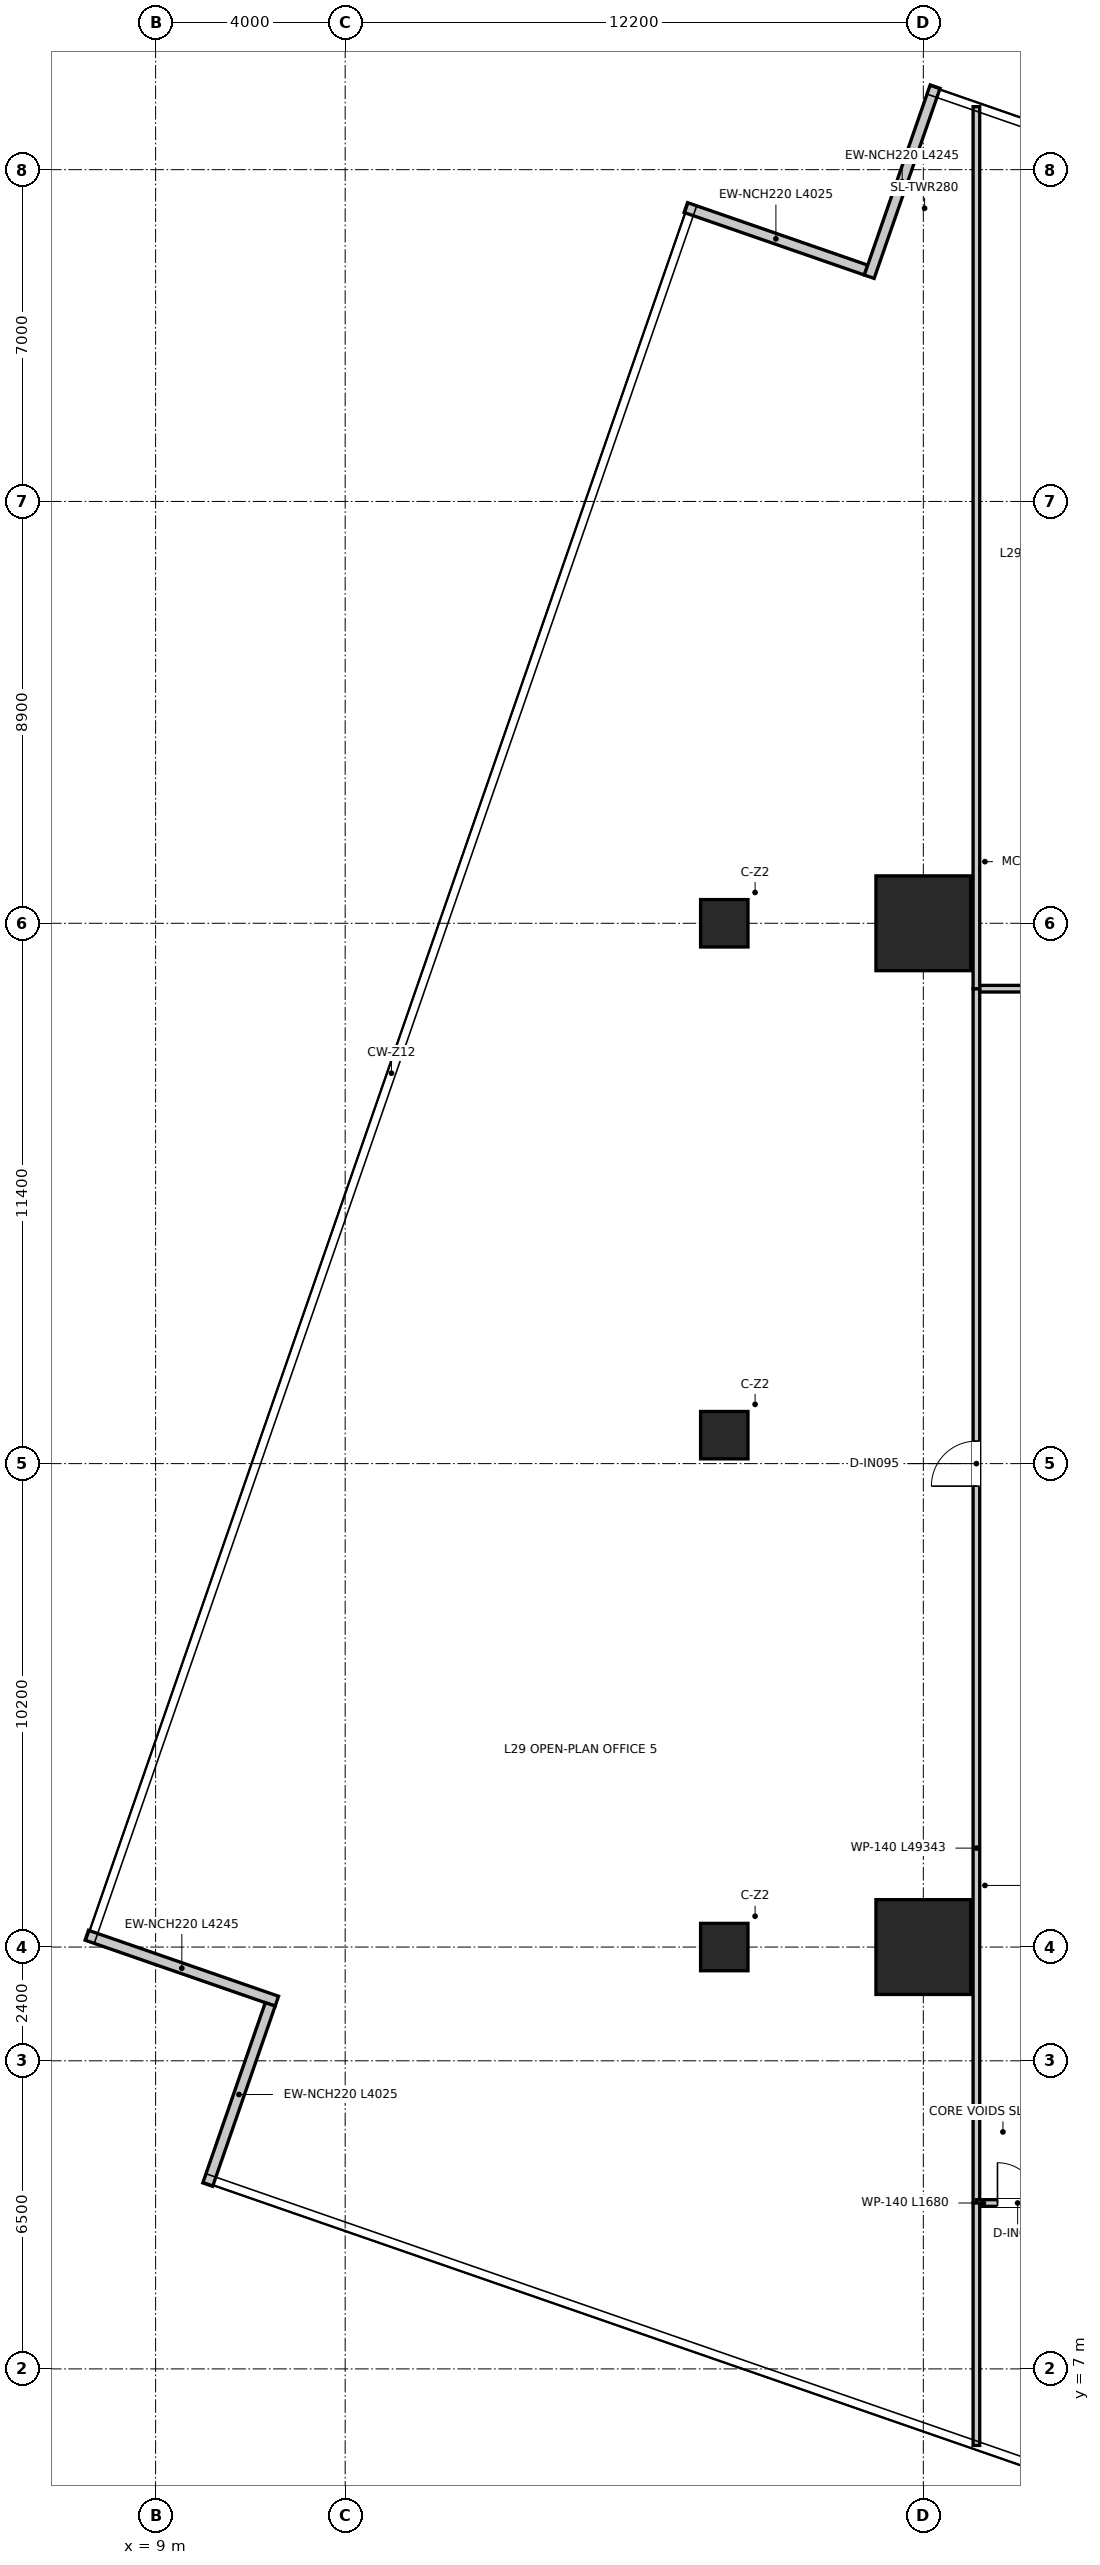
"""IFC4 building model, lengths in metres.
Left out: names, types, materials, properties, quantities, classifications, styles, units other than length and angle.
Written with IfcOpenShell. Run it as: python <this file> out.ifc"""

import sys

from ifc_helpers import new_model, si_unit, direction, frame, frame_2d, origin, origin_2d, place, context, subcontext, project, spatial, rectangle, extrude, source, transform, mapped, element, fill, save


model = new_model("IFC4")
c1 = context("Model", 3, precision=1e-05, world=origin(), true_north=direction((0.0, 1.0)))
c2 = subcontext(c1, "Body", "Model", "MODEL_VIEW")
j1 = project(units=[si_unit("LENGTHUNIT", "METRE"), si_unit("PLANEANGLEUNIT", "RADIAN")], contexts=[c1])
p1 = place(None, origin())
s1 = spatial("IfcSite", under=j1, at=p1, CompositionType="ELEMENT")
p2 = place(p1, origin())
s2 = spatial("IfcBuilding", under=s1, at=p2, CompositionType="ELEMENT")
p3 = place(p2, frame((0.0, 0.0, 121.65)))
s3 = spatial("IfcBuildingStorey", under=s2, at=p3, CompositionType="ELEMENT", Elevation=121.65)
m1 = source(origin(), c2, "Body", "SweptSolid", [
    extrude(rectangle(XDim=2.0, YDim=2.0, at=origin_2d()), origin(), (0.0, 0.0, 1.0), 3.95),
])
for number, where, z_axis, x_axis in (
    (1, (25.2, 15.9, 0.0), (0.0, 0.0, 1.0), (1.0, 0.0, 0.0)),
    (2, (25.2, 37.5, 0.0), (0.0, 0.0, 1.0), (1.0, 0.0, 0.0)),
):
    element("IfcColumn", number, at=place(p3, frame(where, z_axis=z_axis, x_axis=x_axis)), inside=s3, PredefinedType="USERDEFINED", context=c2, shape_type="MappedRepresentation", body=[
        mapped(m1, transform((0.0, 0.0, 0.0), x_axis=(1.0, 0.0, 0.0), y_axis=(0.0, 1.0, 0.0), z_axis=(0.0, 0.0, 1.0), scale=1.0)),
    ])
m2 = source(origin(), c2, "Body", "SweptSolid", [
    extrude(rectangle(XDim=1.0, YDim=1.0, at=origin_2d()), origin(), (0.0, 0.0, 1.0), 3.95),
])
for number, where, z_axis, x_axis in (
    (3, (21.0, 15.9, 0.0), (0.0, 0.0, 1.0), (1.0, 0.0, 0.0)),
    (4, (21.0, 26.7, 0.0), (0.0, 0.0, 1.0), (1.0, 0.0, 0.0)),
    (5, (21.0, 37.5, 0.0), (0.0, 0.0, 1.0), (1.0, 0.0, 0.0)),
):
    element("IfcColumn", number, at=place(p3, frame(where, z_axis=z_axis, x_axis=x_axis)), inside=s3, PredefinedType="COLUMN", context=c2, shape_type="MappedRepresentation", body=[
        mapped(m2, transform((0.0, 0.0, 0.0), x_axis=(1.0, 0.0, 0.0), y_axis=(0.0, 1.0, 0.0), z_axis=(0.0, 0.0, 1.0), scale=1.0)),
    ])
p4 = place(p3, frame((23.991, 51.281, 0.0), z_axis=(0.0, 0.0, 1.0), x_axis=(-0.944792639593, 0.327668839181, 0.0)))
e6 = element("IfcWall", 6, at=p4, inside=s3, PredefinedType="ELEMENTEDWALL", context=c2, shape_type="SweptSolid", body=[
    extrude(rectangle(XDim=4.025, YDim=0.22, at=frame_2d((2.012, 0.0))), origin(), (0.0, 0.0, 1.0), 3.67),
])
p5 = place(p3, frame((7.548, 16.149, 0.0), z_axis=(0.0, 0.0, 1.0), x_axis=(0.944801308279, -0.327643843028, 0.0)))
e7 = element("IfcWall", 7, at=p5, inside=s3, PredefinedType="ELEMENTEDWALL", context=c2, shape_type="SweptSolid", body=[
    extrude(rectangle(XDim=4.245, YDim=0.22, at=frame_2d((2.123, 0.0))), origin(), (0.0, 0.0, 1.0), 3.67),
])
p6 = place(p3, frame((11.419, 14.691, 0.0), z_axis=(0.0, 0.0, 1.0), x_axis=(-0.327668839181, -0.944792639593, 0.0)))
e8 = element("IfcWall", 8, at=p6, inside=s3, PredefinedType="ELEMENTEDWALL", context=c2, shape_type="SweptSolid", body=[
    extrude(rectangle(XDim=4.025, YDim=0.22, at=frame_2d((2.012, 0.0))), origin(), (0.0, 0.0, 1.0), 3.67),
])
p7 = place(p3, frame((25.449, 55.152, 0.0), z_axis=(0.0, 0.0, 1.0), x_axis=(-0.327643843028, -0.944801308279, 0.0)))
e9 = element("IfcWall", 9, at=p7, inside=s3, PredefinedType="ELEMENTEDWALL", context=c2, shape_type="SweptSolid", body=[
    extrude(rectangle(XDim=4.245, YDim=0.22, at=frame_2d((2.123, 0.0))), origin(), (0.0, 0.0, 1.0), 3.67),
])
p8 = place(p3, frame((26.32, 36.12, 0.0), z_axis=(0.0, 0.0, 1.0), x_axis=(1.0, 0.0, 0.0)))
e10 = element("IfcWall", 10, at=p8, inside=s3, PredefinedType="PARTITIONING", context=c2, shape_type="SweptSolid", body=[
    extrude(rectangle(XDim=19.36, YDim=0.14, at=frame_2d((9.68, 0.0))), origin(), (0.0, 0.0, 1.0), 3.08),
])
p9 = place(p8, frame((1.615, 0.0, 0.0)))
e11 = element("IfcOpeningElement", 11, at=p9, cuts=e10, PredefinedType="OPENING", context=c2, shape_type="SweptSolid", body=[
    extrude(rectangle(XDim=0.95, YDim=2.1, at=frame_2d((0.475, 1.05))), frame((0.0, 0.08, 0.0), z_axis=(0.0, -1.0, 0.0), x_axis=(1.0, 0.0, 0.0)), (0.0, 0.0, 1.0), 0.16),
])
p10 = place(p8, frame((6.705, 0.0, 0.0)))
e12 = element("IfcOpeningElement", 12, at=p10, cuts=e10, PredefinedType="OPENING", context=c2, shape_type="SweptSolid", body=[
    extrude(rectangle(XDim=0.95, YDim=2.1, at=frame_2d((0.475, 1.05))), frame((0.0, 0.08, 0.0), z_axis=(0.0, -1.0, 0.0), x_axis=(1.0, 0.0, 0.0)), (0.0, 0.0, 1.0), 0.16),
])
p11 = place(p8, frame((12.705, 0.0, 0.0)))
e13 = element("IfcOpeningElement", 13, at=p11, cuts=e10, PredefinedType="OPENING", context=c2, shape_type="SweptSolid", body=[
    extrude(rectangle(XDim=0.95, YDim=2.1, at=frame_2d((0.475, 1.05))), frame((0.0, 0.08, 0.0), z_axis=(0.0, -1.0, 0.0), x_axis=(1.0, 0.0, 0.0)), (0.0, 0.0, 1.0), 0.16),
])
p12 = place(p8, frame((17.295, 0.0, 0.0)))
e14 = element("IfcOpeningElement", 14, at=p12, cuts=e10, PredefinedType="OPENING", context=c2, shape_type="SweptSolid", body=[
    extrude(rectangle(XDim=0.95, YDim=2.1, at=frame_2d((0.475, 1.05))), frame((0.0, 0.08, 0.0), z_axis=(0.0, -1.0, 0.0), x_axis=(1.0, 0.0, 0.0)), (0.0, 0.0, 1.0), 0.16),
])
p13 = place(p3, frame((26.32, 10.5, 0.0), z_axis=(0.0, 0.0, 1.0), x_axis=(0.0, 1.0, 0.0)))
e15 = element("IfcWall", 15, at=p13, inside=s3, PredefinedType="PARTITIONING", context=c2, shape_type="SweptSolid", body=[
    extrude(rectangle(XDim=25.62, YDim=0.14, at=frame_2d((12.81, 0.0))), origin(), (0.0, 0.0, 1.0), 2.97),
])
p14 = place(p13, frame((15.125, 0.0, 0.0)))
e16 = element("IfcOpeningElement", 16, at=p14, cuts=e15, PredefinedType="OPENING", context=c2, shape_type="SweptSolid", body=[
    extrude(rectangle(XDim=0.95, YDim=2.1, at=frame_2d((0.475, 1.05))), frame((0.0, 0.08, 0.0), z_axis=(0.0, -1.0, 0.0), x_axis=(1.0, 0.0, 0.0)), (0.0, 0.0, 1.0), 0.16),
])
p15 = place(p3, frame((26.32, 10.5, 0.0), z_axis=(0.0, 0.0, 1.0), x_axis=(1.0, 0.0, 0.0)))
e17 = element("IfcWall", 17, at=p15, inside=s3, PredefinedType="PARTITIONING", context=c2, shape_type="SweptSolid", body=[
    extrude(rectangle(XDim=1.68, YDim=0.14, at=frame_2d((0.84, 0.0))), origin(), (0.0, 0.0, 1.0), 3.67),
])
p16 = place(p15, frame((0.445, 0.0, 0.0)))
e18 = element("IfcOpeningElement", 18, at=p16, cuts=e17, PredefinedType="OPENING", context=c2, shape_type="SweptSolid", body=[
    extrude(rectangle(XDim=0.85, YDim=2.1, at=frame_2d((0.425, 1.05))), frame((0.0, 0.08, 0.0), z_axis=(0.0, -1.0, 0.0), x_axis=(1.0, 0.0, 0.0)), (0.0, 0.0, 1.0), 0.16),
])
p17 = place(p3, frame((26.32, 36.12, 0.0), z_axis=(0.0, 0.0, 1.0), x_axis=(0.0, 1.0, 0.0)))
e19 = element("IfcWall", 19, at=p17, inside=s3, PredefinedType="PARTITIONING", context=c2, shape_type="SweptSolid", body=[
    extrude(rectangle(XDim=18.608, YDim=0.14, at=frame_2d((9.304, 0.0))), origin(), (0.0, 0.0, 1.0), 2.97),
])
p18 = place(p3, frame((26.32, 5.385, 0.0), z_axis=(0.0, 0.0, 1.0), x_axis=(0.0, 1.0, 0.0)))
e20 = element("IfcWall", 20, at=p18, inside=s3, PredefinedType="PARTITIONING", context=c2, shape_type="SweptSolid", body=[
    extrude(rectangle(XDim=5.115, YDim=0.14, at=frame_2d((2.558, 0.0))), origin(), (0.0, 0.0, 1.0), 3.67),
])
p19 = place(p14, origin())
e21 = element("IfcDoor", 21, at=p19, inside=s3, OperationType="SINGLE_SWING_LEFT", PredefinedType="DOOR", context=c2, shape_type="SweptSolid", body=[
    extrude(rectangle(XDim=0.95, YDim=2.1, at=frame_2d((0.475, 1.05))), frame((0.0, 0.025, 0.0), z_axis=(0.0, -1.0, 0.0), x_axis=(1.0, 0.0, 0.0)), (0.0, 0.0, 1.0), 0.05),
])
fill(e16, e21)
p20 = place(p16, origin())
e22 = element("IfcDoor", 22, at=p20, inside=s3, OperationType="SINGLE_SWING_LEFT", PredefinedType="DOOR", context=c2, shape_type="SweptSolid", body=[
    extrude(rectangle(XDim=0.85, YDim=2.1, at=frame_2d((0.425, 1.05))), frame((0.0, 0.025, 0.0), z_axis=(0.0, -1.0, 0.0), x_axis=(1.0, 0.0, 0.0)), (0.0, 0.0, 1.0), 0.05),
])
fill(e18, e22)
save(model, sys.argv[1])
